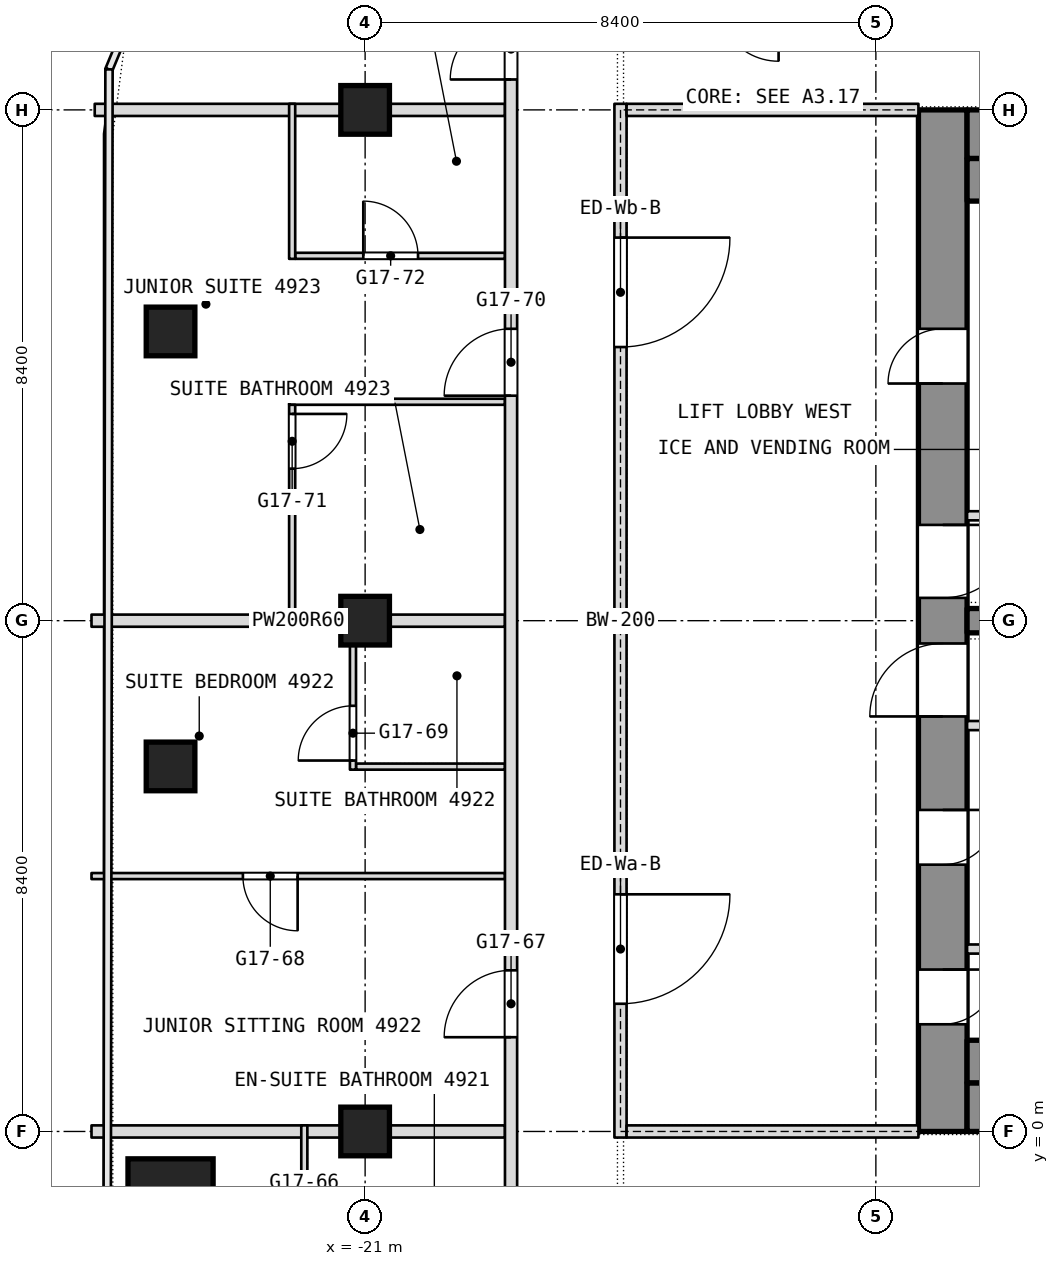
"""IFC4 building model, lengths in metres.
Left out: names, types, materials, properties, quantities, classifications, styles, units other than length and angle.
Written with IfcOpenShell. Run it as: python <this file> out.ifc"""

import sys

from ifc_helpers import new_model, si_unit, direction, frame, frame_2d, origin, origin_2d, place, context, subcontext, project, spatial, rectangle, extrude, element, fill, save


model = new_model("IFC4")
c1 = context("Model", 3, precision=1e-05, world=origin(), true_north=direction((0.0, 1.0)))
c2 = subcontext(c1, "Body", "Model", "MODEL_VIEW")
j1 = project(units=[si_unit("LENGTHUNIT", "METRE"), si_unit("PLANEANGLEUNIT", "RADIAN")], contexts=[c1])
p1 = place(None, origin())
s1 = spatial("IfcSite", under=j1, at=p1, CompositionType="ELEMENT")
p2 = place(p1, origin())
s2 = spatial("IfcBuilding", under=s1, at=p2, CompositionType="ELEMENT")
p3 = place(p2, frame((0.0, 0.0, 212.9)))
s3 = spatial("IfcBuildingStorey", under=s2, at=p3, CompositionType="ELEMENT", Elevation=212.9)
p4 = place(p3, frame((-11.5, 0.0, 0.0), z_axis=(0.0, 0.0, 1.0), x_axis=(0.0, 1.0, 0.0)))
e1 = element("IfcWall", 1, at=p4, inside=s3, PredefinedType="SHEAR", context=c2, shape_type="SweptSolid", body=[
    extrude(rectangle(XDim=16.8, YDim=0.8, at=frame_2d((8.4, 0.0))), origin(), (0.0, 0.0, 1.0), 3.6),
])
p5 = place(p4, frame((1.762, 0.0, 0.0)))
e2 = element("IfcOpeningElement", 2, at=p5, cuts=e1, PredefinedType="OPENING", context=c2, shape_type="SweptSolid", body=[
    extrude(rectangle(XDim=0.9, YDim=2.1, at=frame_2d((0.45, 1.05))), frame((0.0, 0.4, 0.0), z_axis=(0.0, -1.0, 0.0), x_axis=(1.0, 0.0, 0.0)), (0.0, 0.0, 1.0), 0.8),
])
p6 = place(p4, frame((4.387, 0.0, 0.0)))
e3 = element("IfcOpeningElement", 3, at=p6, cuts=e1, PredefinedType="OPENING", context=c2, shape_type="SweptSolid", body=[
    extrude(rectangle(XDim=0.9, YDim=2.1, at=frame_2d((0.45, 1.05))), frame((0.0, 0.4, 0.0), z_axis=(0.0, -1.0, 0.0), x_axis=(1.0, 0.0, 0.0)), (0.0, 0.0, 1.0), 0.8),
])
p7 = place(p4, frame((6.825, 0.0, 0.0)))
e4 = element("IfcOpeningElement", 4, at=p7, cuts=e1, PredefinedType="OPENING", context=c2, shape_type="SweptSolid", body=[
    extrude(rectangle(XDim=1.2, YDim=2.1, at=frame_2d((0.6, 1.05))), frame((0.0, 0.4, 0.0), z_axis=(0.0, -1.0, 0.0), x_axis=(1.0, 0.0, 0.0)), (0.0, 0.0, 1.0), 0.8),
])
p8 = place(p4, frame((12.3, 0.0, 0.0)))
e5 = element("IfcOpeningElement", 5, at=p8, cuts=e1, PredefinedType="OPENING", context=c2, shape_type="SweptSolid", body=[
    extrude(rectangle(XDim=0.9, YDim=2.1, at=frame_2d((0.45, 1.05))), frame((0.0, 0.4, 0.0), z_axis=(0.0, -1.0, 0.0), x_axis=(1.0, 0.0, 0.0)), (0.0, 0.0, 1.0), 0.8),
])
p9 = place(p4, frame((8.775, 0.0, 0.0)))
e6 = element("IfcOpeningElement", 6, at=p9, cuts=e1, PredefinedType="OPENING", context=c2, shape_type="SweptSolid", body=[
    extrude(rectangle(XDim=1.2, YDim=2.1, at=frame_2d((0.6, 1.05))), frame((0.0, 0.4, 0.0), z_axis=(0.0, -1.0, 0.0), x_axis=(1.0, 0.0, 0.0)), (0.0, 0.0, 1.0), 0.8),
])
for number, where, z_axis, x_axis in (
    (7, (-11.1, 0.4, 0.0), (0.0, 0.0, 1.0), (1.0, 0.0, 0.0)),
    (8, (-11.1, 16.4, 0.0), (0.0, 0.0, 1.0), (1.0, 0.0, 0.0)),
):
    element("IfcWall", number, at=place(p3, frame(where, z_axis=z_axis, x_axis=x_axis)), inside=s3, PredefinedType="SHEAR", context=c2, shape_type="SweptSolid", body=[
        extrude(rectangle(XDim=22.2, YDim=0.8, at=frame_2d((11.1, 0.0))), origin(), (0.0, 0.0, 1.0), 3.6),
    ])
p10 = place(p3, frame((-11.1, 8.4, 0.0), z_axis=(0.0, 0.0, 1.0), x_axis=(1.0, 0.0, 0.0)))
e9 = element("IfcWall", 9, at=p10, inside=s3, PredefinedType="SHEAR", context=c2, shape_type="SweptSolid", body=[
    extrude(rectangle(XDim=6.7, YDim=0.4, at=frame_2d((3.35, 0.0))), origin(), (0.0, 0.0, 1.0), 3.6),
])
p11 = place(p3, frame((-24.2, -1.15, 0.0), z_axis=(0.0, 0.0, 1.0), x_axis=(1.0, 0.0, 0.0)))
e10 = element("IfcColumn", 10, at=p11, inside=s3, PredefinedType="COLUMN", context=c2, shape_type="SweptSolid", body=[
    extrude(rectangle(XDim=1.4, YDim=1.4, at=origin_2d()), origin(), (0.0, 0.0, 1.0), 3.6),
])
for number, where, z_axis, x_axis in (
    (11, (-21.0, 0.0, 0.0), (0.0, 0.0, 1.0), (1.0, 0.0, 0.0)),
    (12, (-21.0, 8.4, 0.0), (0.0, 0.0, 1.0), (1.0, 0.0, 0.0)),
    (13, (-21.0, 16.8, 0.0), (0.0, 0.0, 1.0), (1.0, 0.0, 0.0)),
    (14, (-24.2, 6.003, 0.0), (0.0, 0.0, 1.0), (1.0, 0.0, 0.0)),
    (15, (-24.2, 13.156, 0.0), (0.0, 0.0, 1.0), (1.0, 0.0, 0.0)),
):
    element("IfcColumn", number, at=place(p3, frame(where, z_axis=z_axis, x_axis=x_axis)), inside=s3, PredefinedType="COLUMN", context=c2, shape_type="SweptSolid", body=[
        extrude(rectangle(XDim=0.8, YDim=0.8, at=origin_2d()), origin(), (0.0, 0.0, 1.0), 3.6),
    ])
p12 = place(p3, frame((-25.5, 0.0, 0.0), z_axis=(0.0, 0.0, 1.0), x_axis=(1.0, 0.0, 0.0)))
e16 = element("IfcWall", 16, at=p12, inside=s3, PredefinedType="PARTITIONING", context=c2, shape_type="SweptSolid", body=[
    extrude(rectangle(XDim=6.8, YDim=0.2, at=frame_2d((3.4, 0.0))), origin(), (0.0, 0.0, 1.0), 2.94),
])
p13 = place(p3, frame((-25.5, 4.2, 0.0), z_axis=(0.0, 0.0, 1.0), x_axis=(1.0, 0.0, 0.0)))
e17 = element("IfcWall", 17, at=p13, inside=s3, PredefinedType="PARTITIONING", context=c2, shape_type="SweptSolid", body=[
    extrude(rectangle(XDim=6.8, YDim=0.1, at=frame_2d((3.4, 0.0))), origin(), (0.0, 0.0, 1.0), 3.34),
])
p14 = place(p13, frame((2.49, 0.0, 0.0)))
e18 = element("IfcOpeningElement", 18, at=p14, cuts=e17, PredefinedType="OPENING", context=c2, shape_type="SweptSolid", body=[
    extrude(rectangle(XDim=0.9, YDim=2.1, at=frame_2d((0.45, 1.05))), frame((0.0, 0.05, 0.0), z_axis=(0.0, -1.0, 0.0), x_axis=(1.0, 0.0, 0.0)), (0.0, 0.0, 1.0), 0.1),
])
p15 = place(p3, frame((-21.15, 6.0, 0.0), z_axis=(0.0, 0.0, 1.0), x_axis=(1.0, 0.0, 0.0)))
e19 = element("IfcWall", 19, at=p15, inside=s3, PredefinedType="PARTITIONING", context=c2, shape_type="SweptSolid", body=[
    extrude(rectangle(XDim=2.45, YDim=0.1, at=frame_2d((1.225, 0.0))), origin(), (0.0, 0.0, 1.0), 3.34),
])
p16 = place(p3, frame((-25.5, 8.4, 0.0), z_axis=(0.0, 0.0, 1.0), x_axis=(1.0, 0.0, 0.0)))
e20 = element("IfcWall", 20, at=p16, inside=s3, PredefinedType="PARTITIONING", context=c2, shape_type="SweptSolid", body=[
    extrude(rectangle(XDim=6.8, YDim=0.2, at=frame_2d((3.4, 0.0))), origin(), (0.0, 0.0, 1.0), 2.94),
])
p17 = place(p3, frame((-22.25, 12.0, 0.0), z_axis=(0.0, 0.0, 1.0), x_axis=(1.0, 0.0, 0.0)))
e21 = element("IfcWall", 21, at=p17, inside=s3, PredefinedType="PARTITIONING", context=c2, shape_type="SweptSolid", body=[
    extrude(rectangle(XDim=3.55, YDim=0.1, at=frame_2d((1.775, 0.0))), origin(), (0.0, 0.0, 1.0), 3.34),
])
p18 = place(p3, frame((-22.15, 14.4, 0.0), z_axis=(0.0, 0.0, 1.0), x_axis=(1.0, 0.0, 0.0)))
e22 = element("IfcWall", 22, at=p18, inside=s3, PredefinedType="PARTITIONING", context=c2, shape_type="SweptSolid", body=[
    extrude(rectangle(XDim=3.45, YDim=0.1, at=frame_2d((1.725, 0.0))), origin(), (0.0, 0.0, 1.0), 3.34),
])
p19 = place(p18, frame((1.12, 0.0, 0.0)))
e23 = element("IfcOpeningElement", 23, at=p19, cuts=e22, PredefinedType="OPENING", context=c2, shape_type="SweptSolid", body=[
    extrude(rectangle(XDim=0.9, YDim=2.1, at=frame_2d((0.45, 1.05))), frame((0.0, 0.05, 0.0), z_axis=(0.0, -1.0, 0.0), x_axis=(1.0, 0.0, 0.0)), (0.0, 0.0, 1.0), 0.1),
])
p20 = place(p3, frame((-25.447, 16.8, 0.0), z_axis=(0.0, 0.0, 1.0), x_axis=(1.0, 0.0, 0.0)))
e24 = element("IfcWall", 24, at=p20, inside=s3, PredefinedType="PARTITIONING", context=c2, shape_type="SweptSolid", body=[
    extrude(rectangle(XDim=6.747, YDim=0.2, at=frame_2d((3.374, 0.0))), origin(), (0.0, 0.0, 1.0), 2.94),
])
p21 = place(p3, frame((-18.6, -26.751, 0.0), z_axis=(0.0, 0.0, 1.0), x_axis=(0.0, 1.0, 0.0)))
e25 = element("IfcWall", 25, at=p21, inside=s3, PredefinedType="PARTITIONING", context=c2, shape_type="SweptSolid", body=[
    extrude(rectangle(XDim=49.091, YDim=0.2, at=frame_2d((24.545, 0.0))), origin(), (0.0, 0.0, 1.0), 3.34),
])
p22 = place(p21, frame((3.413, 0.0, 0.0)))
e26 = element("IfcOpeningElement", 26, at=p22, cuts=e25, PredefinedType="OPENING", context=c2, shape_type="SweptSolid", body=[
    extrude(rectangle(XDim=1.0, YDim=2.1, at=frame_2d((0.5, 1.05))), frame((0.0, 0.1, 0.0), z_axis=(0.0, -1.0, 0.0), x_axis=(1.0, 0.0, 0.0)), (0.0, 0.0, 1.0), 0.2),
])
p23 = place(p21, frame((5.838, 0.0, 0.0)))
e27 = element("IfcOpeningElement", 27, at=p23, cuts=e25, PredefinedType="OPENING", context=c2, shape_type="SweptSolid", body=[
    extrude(rectangle(XDim=1.0, YDim=2.1, at=frame_2d((0.5, 1.05))), frame((0.0, 0.1, 0.0), z_axis=(0.0, -1.0, 0.0), x_axis=(1.0, 0.0, 0.0)), (0.0, 0.0, 1.0), 0.2),
])
p24 = place(p21, frame((13.551, 0.0, 0.0)))
e28 = element("IfcOpeningElement", 28, at=p24, cuts=e25, PredefinedType="OPENING", context=c2, shape_type="SweptSolid", body=[
    extrude(rectangle(XDim=1.1, YDim=2.1, at=frame_2d((0.55, 1.05))), frame((0.0, 0.1, 0.0), z_axis=(0.0, -1.0, 0.0), x_axis=(1.0, 0.0, 0.0)), (0.0, 0.0, 1.0), 0.2),
])
p25 = place(p21, frame((21.151, 0.0, 0.0)))
e29 = element("IfcOpeningElement", 29, at=p25, cuts=e25, PredefinedType="OPENING", context=c2, shape_type="SweptSolid", body=[
    extrude(rectangle(XDim=1.0, YDim=2.1, at=frame_2d((0.5, 1.05))), frame((0.0, 0.1, 0.0), z_axis=(0.0, -1.0, 0.0), x_axis=(1.0, 0.0, 0.0)), (0.0, 0.0, 1.0), 0.2),
])
p26 = place(p21, frame((22.951, 0.0, 0.0)))
e30 = element("IfcOpeningElement", 30, at=p26, cuts=e25, PredefinedType="OPENING", context=c2, shape_type="SweptSolid", body=[
    extrude(rectangle(XDim=1.0, YDim=2.1, at=frame_2d((0.5, 1.05))), frame((0.0, 0.1, 0.0), z_axis=(0.0, -1.0, 0.0), x_axis=(1.0, 0.0, 0.0)), (0.0, 0.0, 1.0), 0.2),
])
p27 = place(p21, frame((28.301, 0.0, 0.0)))
e31 = element("IfcOpeningElement", 31, at=p27, cuts=e25, PredefinedType="OPENING", context=c2, shape_type="SweptSolid", body=[
    extrude(rectangle(XDim=1.1, YDim=2.1, at=frame_2d((0.55, 1.05))), frame((0.0, 0.1, 0.0), z_axis=(0.0, -1.0, 0.0), x_axis=(1.0, 0.0, 0.0)), (0.0, 0.0, 1.0), 0.2),
])
p28 = place(p21, frame((38.851, 0.0, 0.0)))
e32 = element("IfcOpeningElement", 32, at=p28, cuts=e25, PredefinedType="OPENING", context=c2, shape_type="SweptSolid", body=[
    extrude(rectangle(XDim=1.1, YDim=2.1, at=frame_2d((0.55, 1.05))), frame((0.0, 0.1, 0.0), z_axis=(0.0, -1.0, 0.0), x_axis=(1.0, 0.0, 0.0)), (0.0, 0.0, 1.0), 0.2),
])
p29 = place(p21, frame((44.051, 0.0, 0.0)))
e33 = element("IfcOpeningElement", 33, at=p29, cuts=e25, PredefinedType="OPENING", context=c2, shape_type="SweptSolid", body=[
    extrude(rectangle(XDim=1.0, YDim=2.1, at=frame_2d((0.5, 1.05))), frame((0.0, 0.1, 0.0), z_axis=(0.0, -1.0, 0.0), x_axis=(1.0, 0.0, 0.0)), (0.0, 0.0, 1.0), 0.2),
])
p30 = place(p3, frame((-21.2, 5.95, 0.0), z_axis=(0.0, 0.0, 1.0), x_axis=(0.0, 1.0, 0.0)))
e34 = element("IfcWall", 34, at=p30, inside=s3, PredefinedType="PARTITIONING", context=c2, shape_type="SweptSolid", body=[
    extrude(rectangle(XDim=2.55, YDim=0.1, at=frame_2d((1.275, 0.0))), origin(), (0.0, 0.0, 1.0), 3.34),
])
p31 = place(p30, frame((0.15, 0.0, 0.0)))
e35 = element("IfcOpeningElement", 35, at=p31, cuts=e34, PredefinedType="OPENING", context=c2, shape_type="SweptSolid", body=[
    extrude(rectangle(XDim=0.9, YDim=2.1, at=frame_2d((0.45, 1.05))), frame((0.0, 0.05, 0.0), z_axis=(0.0, -1.0, 0.0), x_axis=(1.0, 0.0, 0.0)), (0.0, 0.0, 1.0), 0.1),
])
p32 = place(p3, frame((-22.0, -2.45, 0.0), z_axis=(0.0, 0.0, 1.0), x_axis=(0.0, 1.0, 0.0)))
e36 = element("IfcWall", 36, at=p32, inside=s3, PredefinedType="PARTITIONING", context=c2, shape_type="SweptSolid", body=[
    extrude(rectangle(XDim=2.55, YDim=0.1, at=frame_2d((1.275, 0.0))), origin(), (0.0, 0.0, 1.0), 3.34),
])
p33 = place(p32, frame((0.15, 0.0, 0.0)))
e37 = element("IfcOpeningElement", 37, at=p33, cuts=e36, PredefinedType="OPENING", context=c2, shape_type="SweptSolid", body=[
    extrude(rectangle(XDim=0.9, YDim=2.1, at=frame_2d((0.45, 1.05))), frame((0.0, 0.05, 0.0), z_axis=(0.0, -1.0, 0.0), x_axis=(1.0, 0.0, 0.0)), (0.0, 0.0, 1.0), 0.1),
])
p34 = place(p3, frame((-22.2, 8.5, 0.0), z_axis=(0.0, 0.0, 1.0), x_axis=(0.0, 1.0, 0.0)))
e38 = element("IfcWall", 38, at=p34, inside=s3, PredefinedType="PARTITIONING", context=c2, shape_type="SweptSolid", body=[
    extrude(rectangle(XDim=3.45, YDim=0.1, at=frame_2d((1.725, 0.0))), origin(), (0.0, 0.0, 1.0), 3.34),
])
p35 = place(p34, frame((2.4, 0.0, 0.0)))
e39 = element("IfcOpeningElement", 39, at=p35, cuts=e38, PredefinedType="OPENING", context=c2, shape_type="SweptSolid", body=[
    extrude(rectangle(XDim=0.9, YDim=2.1, at=frame_2d((0.45, 1.05))), frame((0.0, 0.05, 0.0), z_axis=(0.0, -1.0, 0.0), x_axis=(1.0, 0.0, 0.0)), (0.0, 0.0, 1.0), 0.1),
])
p36 = place(p3, frame((-22.2, 14.35, 0.0), z_axis=(0.0, 0.0, 1.0), x_axis=(0.0, 1.0, 0.0)))
e40 = element("IfcWall", 40, at=p36, inside=s3, PredefinedType="PARTITIONING", context=c2, shape_type="SweptSolid", body=[
    extrude(rectangle(XDim=2.55, YDim=0.1, at=frame_2d((1.275, 0.0))), origin(), (0.0, 0.0, 1.0), 3.34),
])
for number, where, z_axis, x_axis in (
    (41, (-11.1, 1.15, 0.0), (0.0, 0.0, 1.0), (1.0, 0.0, 0.0)),
    (42, (-11.1, 15.65, 0.0), (0.0, 0.0, 1.0), (1.0, 0.0, 0.0)),
):
    element("IfcWall", number, at=place(p3, frame(where, z_axis=z_axis, x_axis=x_axis)), inside=s3, PredefinedType="PARTITIONING", context=c2, shape_type="SweptSolid", body=[
        extrude(rectangle(XDim=22.2, YDim=0.7, at=frame_2d((11.1, 0.0))), origin(), (0.0, 0.0, 1.0), 3.34),
    ])
for number, where, z_axis, x_axis in (
    (43, (-11.1, 6.675, 0.0), (0.0, 0.0, 1.0), (1.0, 0.0, 0.0)),
    (44, (-11.1, 3.0, 0.0), (0.0, 0.0, 1.0), (1.0, 0.0, 0.0)),
    (45, (-11.1, 10.125, 0.0), (0.0, 0.0, 1.0), (1.0, 0.0, 0.0)),
):
    element("IfcWall", number, at=place(p3, frame(where, z_axis=z_axis, x_axis=x_axis)), inside=s3, PredefinedType="PARTITIONING", context=c2, shape_type="SweptSolid", body=[
        extrude(rectangle(XDim=2.1, YDim=0.15, at=frame_2d((1.05, 0.0))), origin(), (0.0, 0.0, 1.0), 3.34),
    ])
p37 = place(p3, frame((-16.8, -0.1, 0.0), z_axis=(0.0, 0.0, 1.0), x_axis=(0.0, 1.0, 0.0)))
e46 = element("IfcWall", 46, at=p37, inside=s3, PredefinedType="PARTITIONING", context=c2, shape_type="SweptSolid", body=[
    extrude(rectangle(XDim=17.0, YDim=0.2, at=frame_2d((8.5, 0.0))), origin(), (0.0, 0.0, 1.0), 3.34),
])
p38 = place(p37, frame((2.2, 0.0, 0.0)))
e47 = element("IfcOpeningElement", 47, at=p38, cuts=e46, PredefinedType="OPENING", context=c2, shape_type="SweptSolid", body=[
    extrude(rectangle(XDim=1.8, YDim=2.1, at=frame_2d((0.9, 1.05))), frame((0.0, 0.1, 0.0), z_axis=(0.0, -1.0, 0.0), x_axis=(1.0, 0.0, 0.0)), (0.0, 0.0, 1.0), 0.2),
])
p39 = place(p37, frame((13.0, 0.0, 0.0)))
e48 = element("IfcOpeningElement", 48, at=p39, cuts=e46, PredefinedType="OPENING", context=c2, shape_type="SweptSolid", body=[
    extrude(rectangle(XDim=1.8, YDim=2.1, at=frame_2d((0.9, 1.05))), frame((0.0, 0.1, 0.0), z_axis=(0.0, -1.0, 0.0), x_axis=(1.0, 0.0, 0.0)), (0.0, 0.0, 1.0), 0.2),
])
for number, where, z_axis, x_axis in (
    (49, (-16.7, 0.0, 0.0), (0.0, 0.0, 1.0), (1.0, 0.0, 0.0)),
    (50, (-16.7, 16.8, 0.0), (0.0, 0.0, 1.0), (1.0, 0.0, 0.0)),
):
    element("IfcWall", number, at=place(p3, frame(where, z_axis=z_axis, x_axis=x_axis)), inside=s3, PredefinedType="PARTITIONING", context=c2, shape_type="SweptSolid", body=[
        extrude(rectangle(XDim=4.8, YDim=0.2, at=frame_2d((2.4, 0.0))), origin(), (0.0, 0.0, 1.0), 2.94),
    ])
p40 = place(p14, origin())
e51 = element("IfcDoor", 51, at=p40, inside=s3, OperationType="SINGLE_SWING_LEFT", PredefinedType="DOOR", context=c2, shape_type="SweptSolid", body=[
    extrude(rectangle(XDim=0.9, YDim=2.1, at=frame_2d((0.45, 1.05))), frame((0.0, 0.025, 0.0), z_axis=(0.0, -1.0, 0.0), x_axis=(1.0, 0.0, 0.0)), (0.0, 0.0, 1.0), 0.05),
])
fill(e18, e51)
p41 = place(p19, origin())
e52 = element("IfcDoor", 52, at=p41, inside=s3, OperationType="SINGLE_SWING_LEFT", PredefinedType="DOOR", context=c2, shape_type="SweptSolid", body=[
    extrude(rectangle(XDim=0.9, YDim=2.1, at=frame_2d((0.45, 1.05))), frame((0.0, 0.025, 0.0), z_axis=(0.0, -1.0, 0.0), x_axis=(1.0, 0.0, 0.0)), (0.0, 0.0, 1.0), 0.05),
])
fill(e23, e52)
p42 = place(p27, origin())
e53 = element("IfcDoor", 53, at=p42, inside=s3, OperationType="SINGLE_SWING_RIGHT", PredefinedType="DOOR", context=c2, shape_type="SweptSolid", body=[
    extrude(rectangle(XDim=1.1, YDim=2.1, at=frame_2d((0.55, 1.05))), frame((0.0, 0.025, 0.0), z_axis=(0.0, -1.0, 0.0), x_axis=(1.0, 0.0, 0.0)), (0.0, 0.0, 1.0), 0.05),
])
fill(e31, e53)
p43 = place(p28, origin())
e54 = element("IfcDoor", 54, at=p43, inside=s3, OperationType="SINGLE_SWING_LEFT", PredefinedType="DOOR", context=c2, shape_type="SweptSolid", body=[
    extrude(rectangle(XDim=1.1, YDim=2.1, at=frame_2d((0.55, 1.05))), frame((0.0, 0.025, 0.0), z_axis=(0.0, -1.0, 0.0), x_axis=(1.0, 0.0, 0.0)), (0.0, 0.0, 1.0), 0.05),
])
fill(e32, e54)
p44 = place(p29, origin())
e55 = element("IfcDoor", 55, at=p44, inside=s3, OperationType="SINGLE_SWING_RIGHT", PredefinedType="DOOR", context=c2, shape_type="SweptSolid", body=[
    extrude(rectangle(XDim=1.0, YDim=2.1, at=frame_2d((0.5, 1.05))), frame((0.0, 0.025, 0.0), z_axis=(0.0, -1.0, 0.0), x_axis=(1.0, 0.0, 0.0)), (0.0, 0.0, 1.0), 0.05),
])
fill(e33, e55)
p45 = place(p31, origin())
e56 = element("IfcDoor", 56, at=p45, inside=s3, OperationType="SINGLE_SWING_RIGHT", PredefinedType="DOOR", context=c2, shape_type="SweptSolid", body=[
    extrude(rectangle(XDim=0.9, YDim=2.1, at=frame_2d((0.45, 1.05))), frame((0.0, 0.025, 0.0), z_axis=(0.0, -1.0, 0.0), x_axis=(1.0, 0.0, 0.0)), (0.0, 0.0, 1.0), 0.05),
])
fill(e35, e56)
p46 = place(p35, origin())
e57 = element("IfcDoor", 57, at=p46, inside=s3, OperationType="SINGLE_SWING_LEFT", PredefinedType="DOOR", context=c2, shape_type="SweptSolid", body=[
    extrude(rectangle(XDim=0.9, YDim=2.1, at=frame_2d((0.45, 1.05))), frame((0.0, 0.025, 0.0), z_axis=(0.0, -1.0, 0.0), x_axis=(1.0, 0.0, 0.0)), (0.0, 0.0, 1.0), 0.05),
])
fill(e39, e57)
p47 = place(p5, origin())
e58 = element("IfcDoor", 58, at=p47, inside=s3, OperationType="SINGLE_SWING_LEFT", PredefinedType="DOOR", context=c2, shape_type="SweptSolid", body=[
    extrude(rectangle(XDim=0.9, YDim=2.1, at=frame_2d((0.45, 1.05))), frame((0.0, 0.025, 0.0), z_axis=(0.0, -1.0, 0.0), x_axis=(1.0, 0.0, 0.0)), (0.0, 0.0, 1.0), 0.05),
])
fill(e2, e58)
p48 = place(p6, origin())
e59 = element("IfcDoor", 59, at=p48, inside=s3, OperationType="SINGLE_SWING_LEFT", PredefinedType="DOOR", context=c2, shape_type="SweptSolid", body=[
    extrude(rectangle(XDim=0.9, YDim=2.1, at=frame_2d((0.45, 1.05))), frame((0.0, 0.025, 0.0), z_axis=(0.0, -1.0, 0.0), x_axis=(1.0, 0.0, 0.0)), (0.0, 0.0, 1.0), 0.05),
])
fill(e3, e59)
p49 = place(p7, origin())
e60 = element("IfcDoor", 60, at=p49, inside=s3, OperationType="SINGLE_SWING_LEFT", PredefinedType="DOOR", context=c2, shape_type="SweptSolid", body=[
    extrude(rectangle(XDim=1.2, YDim=2.1, at=frame_2d((0.6, 1.05))), frame((0.0, 0.025, 0.0), z_axis=(0.0, -1.0, 0.0), x_axis=(1.0, 0.0, 0.0)), (0.0, 0.0, 1.0), 0.05),
])
fill(e4, e60)
p50 = place(p8, origin())
e61 = element("IfcDoor", 61, at=p50, inside=s3, OperationType="SINGLE_SWING_LEFT", PredefinedType="DOOR", context=c2, shape_type="SweptSolid", body=[
    extrude(rectangle(XDim=0.9, YDim=2.1, at=frame_2d((0.45, 1.05))), frame((0.0, 0.025, 0.0), z_axis=(0.0, -1.0, 0.0), x_axis=(1.0, 0.0, 0.0)), (0.0, 0.0, 1.0), 0.05),
])
fill(e5, e61)
p51 = place(p9, origin())
e62 = element("IfcDoor", 62, at=p51, inside=s3, OperationType="SINGLE_SWING_LEFT", PredefinedType="DOOR", context=c2, shape_type="SweptSolid", body=[
    extrude(rectangle(XDim=1.2, YDim=2.1, at=frame_2d((0.6, 1.05))), frame((0.0, 0.025, 0.0), z_axis=(0.0, -1.0, 0.0), x_axis=(1.0, 0.0, 0.0)), (0.0, 0.0, 1.0), 0.05),
])
fill(e6, e62)
p52 = place(p38, origin())
e63 = element("IfcDoor", 63, at=p52, inside=s3, OperationType="DOUBLE_DOOR_SINGLE_SWING", PredefinedType="DOOR", context=c2, shape_type="SweptSolid", body=[
    extrude(rectangle(XDim=1.8, YDim=2.1, at=frame_2d((0.9, 1.05))), frame((0.0, 0.025, 0.0), z_axis=(0.0, -1.0, 0.0), x_axis=(1.0, 0.0, 0.0)), (0.0, 0.0, 1.0), 0.05),
])
fill(e47, e63)
p53 = place(p39, origin())
e64 = element("IfcDoor", 64, at=p53, inside=s3, OperationType="DOUBLE_DOOR_SINGLE_SWING", PredefinedType="DOOR", context=c2, shape_type="SweptSolid", body=[
    extrude(rectangle(XDim=1.8, YDim=2.1, at=frame_2d((0.9, 1.05))), frame((0.0, 0.025, 0.0), z_axis=(0.0, -1.0, 0.0), x_axis=(1.0, 0.0, 0.0)), (0.0, 0.0, 1.0), 0.05),
])
fill(e48, e64)
save(model, sys.argv[1])
